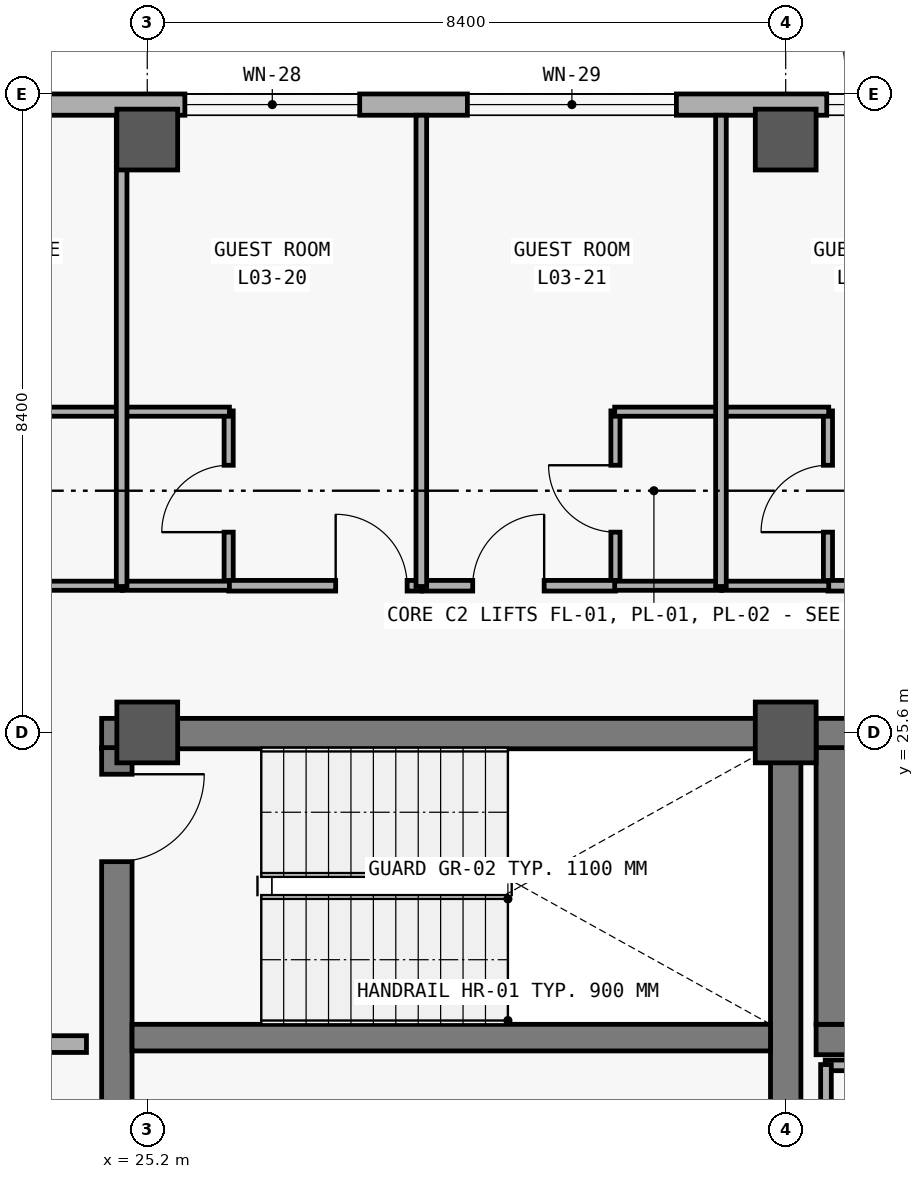
"""IFC4 building model, lengths in metres.
Left out: names, types, materials, properties, quantities, classifications, styles, units other than length and angle.
Written with IfcOpenShell. Run it as: python <this file> out.ifc"""

import sys

from ifc_helpers import new_model, si_unit, direction, frame, frame_2d, origin, origin_2d, place, context, subcontext, project, spatial, rectangle, extrude, element, fill, save


model = new_model("IFC4")
c1 = context("Model", 3, precision=1e-05, world=origin(), true_north=direction((0.0, 1.0)))
c2 = subcontext(c1, "Body", "Model", "MODEL_VIEW")
j1 = project(units=[si_unit("LENGTHUNIT", "METRE"), si_unit("PLANEANGLEUNIT", "RADIAN")], contexts=[c1])
p1 = place(None, origin())
s1 = spatial("IfcSite", under=j1, at=p1, CompositionType="ELEMENT")
p2 = place(p1, origin())
s2 = spatial("IfcBuilding", under=s1, at=p2, CompositionType="ELEMENT")
p3 = place(p2, frame((0.0, 0.0, 15.0)))
s3 = spatial("IfcBuildingStorey", under=s2, at=p3, CompositionType="ELEMENT", Elevation=15.0)
for number, where, z_axis, x_axis in (
    (1, (25.2, 25.6, 0.0), (0.0, 0.0, 1.0), (1.0, 0.0, 0.0)),
    (2, (25.2, 33.4, 0.0), (0.0, 0.0, 1.0), (1.0, 0.0, 0.0)),
    (3, (33.6, 25.6, 0.0), (0.0, 0.0, 1.0), (1.0, 0.0, 0.0)),
    (4, (33.6, 33.4, 0.0), (0.0, 0.0, 1.0), (1.0, 0.0, 0.0)),
):
    element("IfcColumn", number, at=place(p3, frame(where, z_axis=z_axis, x_axis=x_axis)), inside=s3, PredefinedType="COLUMN", context=c2, shape_type="SweptSolid", body=[
        extrude(rectangle(XDim=0.8, YDim=0.8, at=origin_2d()), origin(), (0.0, 0.0, 1.0), 4.2),
    ])
p4 = place(p3, frame((8.68, 33.86, 0.0), z_axis=(0.0, 0.0, 1.0), x_axis=(1.0, 0.0, 0.0)))
e5 = element("IfcWall", 5, at=p4, inside=s3, PredefinedType="SOLIDWALL", context=c2, shape_type="SweptSolid", body=[
    extrude(rectangle(XDim=83.44, YDim=0.28, at=frame_2d((41.72, 0.0))), origin(), (0.0, 0.0, 1.0), 3.92),
])
p5 = place(p4, frame((4.895, 0.0, 0.85)))
e6 = element("IfcOpeningElement", 6, at=p5, cuts=e5, PredefinedType="OPENING", context=c2, shape_type="SweptSolid", body=[
    extrude(rectangle(XDim=2.6, YDim=2.2, at=frame_2d((1.3, 1.1))), frame((0.0, 0.15, 0.0), z_axis=(0.0, -1.0, 0.0), x_axis=(1.0, 0.0, 0.0)), (0.0, 0.0, 1.0), 0.3),
])
p6 = place(p4, frame((13.371, 0.0, 0.85)))
e7 = element("IfcOpeningElement", 7, at=p6, cuts=e5, PredefinedType="OPENING", context=c2, shape_type="SweptSolid", body=[
    extrude(rectangle(XDim=1.7, YDim=2.0, at=frame_2d((0.85, 1.0))), frame((0.0, 0.15, 0.0), z_axis=(0.0, -1.0, 0.0), x_axis=(1.0, 0.0, 0.0)), (0.0, 0.0, 1.0), 0.3),
])
p7 = place(p4, frame((17.015, 0.0, 0.85)))
e8 = element("IfcOpeningElement", 8, at=p7, cuts=e5, PredefinedType="OPENING", context=c2, shape_type="SweptSolid", body=[
    extrude(rectangle(XDim=2.3, YDim=2.05, at=frame_2d((1.15, 1.025))), frame((0.0, 0.15, 0.0), z_axis=(0.0, -1.0, 0.0), x_axis=(1.0, 0.0, 0.0)), (0.0, 0.0, 1.0), 0.3),
])
p8 = place(p4, frame((20.732, 0.0, 0.85)))
e9 = element("IfcOpeningElement", 9, at=p8, cuts=e5, PredefinedType="OPENING", context=c2, shape_type="SweptSolid", body=[
    extrude(rectangle(XDim=2.75, YDim=2.1, at=frame_2d((1.375, 1.05))), frame((0.0, 0.15, 0.0), z_axis=(0.0, -1.0, 0.0), x_axis=(1.0, 0.0, 0.0)), (0.0, 0.0, 1.0), 0.3),
])
p9 = place(p4, frame((25.46, 0.0, 0.85)))
e10 = element("IfcOpeningElement", 10, at=p9, cuts=e5, PredefinedType="OPENING", context=c2, shape_type="SweptSolid", body=[
    extrude(rectangle(XDim=1.18, YDim=1.5, at=frame_2d((0.59, 0.75))), frame((0.0, 0.15, 0.0), z_axis=(0.0, -1.0, 0.0), x_axis=(1.0, 0.0, 0.0)), (0.0, 0.0, 1.0), 0.3),
])
p10 = place(p4, frame((29.352, 0.0, 0.85)))
e11 = element("IfcOpeningElement", 11, at=p10, cuts=e5, PredefinedType="OPENING", context=c2, shape_type="SweptSolid", body=[
    extrude(rectangle(XDim=1.28, YDim=1.6, at=frame_2d((0.64, 0.8))), frame((0.0, 0.15, 0.0), z_axis=(0.0, -1.0, 0.0), x_axis=(1.0, 0.0, 0.0)), (0.0, 0.0, 1.0), 0.3),
])
p11 = place(p4, frame((33.245, 0.0, 0.85)))
e12 = element("IfcOpeningElement", 12, at=p11, cuts=e5, PredefinedType="OPENING", context=c2, shape_type="SweptSolid", body=[
    extrude(rectangle(XDim=1.38, YDim=1.7, at=frame_2d((0.69, 0.85))), frame((0.0, 0.15, 0.0), z_axis=(0.0, -1.0, 0.0), x_axis=(1.0, 0.0, 0.0)), (0.0, 0.0, 1.0), 0.3),
])
p12 = place(p4, frame((37.138, 0.0, 0.85)))
e13 = element("IfcOpeningElement", 13, at=p12, cuts=e5, PredefinedType="OPENING", context=c2, shape_type="SweptSolid", body=[
    extrude(rectangle(XDim=1.48, YDim=1.8, at=frame_2d((0.74, 0.9))), frame((0.0, 0.15, 0.0), z_axis=(0.0, -1.0, 0.0), x_axis=(1.0, 0.0, 0.0)), (0.0, 0.0, 1.0), 0.3),
])
p13 = place(p4, frame((41.031, 0.0, 0.85)))
e14 = element("IfcOpeningElement", 14, at=p13, cuts=e5, PredefinedType="OPENING", context=c2, shape_type="SweptSolid", body=[
    extrude(rectangle(XDim=1.58, YDim=1.85, at=frame_2d((0.79, 0.925))), frame((0.0, 0.15, 0.0), z_axis=(0.0, -1.0, 0.0), x_axis=(1.0, 0.0, 0.0)), (0.0, 0.0, 1.0), 0.3),
])
p14 = place(p4, frame((44.923, 0.0, 0.85)))
e15 = element("IfcOpeningElement", 15, at=p14, cuts=e5, PredefinedType="OPENING", context=c2, shape_type="SweptSolid", body=[
    extrude(rectangle(XDim=1.68, YDim=1.9, at=frame_2d((0.84, 0.95))), frame((0.0, 0.15, 0.0), z_axis=(0.0, -1.0, 0.0), x_axis=(1.0, 0.0, 0.0)), (0.0, 0.0, 1.0), 0.3),
])
p15 = place(p4, frame((48.816, 0.0, 0.85)))
e16 = element("IfcOpeningElement", 16, at=p15, cuts=e5, PredefinedType="OPENING", context=c2, shape_type="SweptSolid", body=[
    extrude(rectangle(XDim=1.78, YDim=1.95, at=frame_2d((0.89, 0.975))), frame((0.0, 0.15, 0.0), z_axis=(0.0, -1.0, 0.0), x_axis=(1.0, 0.0, 0.0)), (0.0, 0.0, 1.0), 0.3),
])
p16 = place(p4, frame((52.71, 0.0, 0.85)))
e17 = element("IfcOpeningElement", 17, at=p16, cuts=e5, PredefinedType="OPENING", context=c2, shape_type="SweptSolid", body=[
    extrude(rectangle(XDim=1.88, YDim=1.95, at=frame_2d((0.94, 0.975))), frame((0.0, 0.15, 0.0), z_axis=(0.0, -1.0, 0.0), x_axis=(1.0, 0.0, 0.0)), (0.0, 0.0, 1.0), 0.3),
])
p17 = place(p4, frame((56.567, 0.0, 0.85)))
e18 = element("IfcOpeningElement", 18, at=p17, cuts=e5, PredefinedType="OPENING", context=c2, shape_type="SweptSolid", body=[
    extrude(rectangle(XDim=2.05, YDim=1.95, at=frame_2d((1.025, 0.975))), frame((0.0, 0.15, 0.0), z_axis=(0.0, -1.0, 0.0), x_axis=(1.0, 0.0, 0.0)), (0.0, 0.0, 1.0), 0.3),
])
p18 = place(p4, frame((60.444, 0.0, 0.85)))
e19 = element("IfcOpeningElement", 19, at=p18, cuts=e5, PredefinedType="OPENING", context=c2, shape_type="SweptSolid", body=[
    extrude(rectangle(XDim=2.18, YDim=1.95, at=frame_2d((1.09, 0.975))), frame((0.0, 0.15, 0.0), z_axis=(0.0, -1.0, 0.0), x_axis=(1.0, 0.0, 0.0)), (0.0, 0.0, 1.0), 0.3),
])
p19 = place(p4, frame((64.287, 0.0, 0.85)))
e20 = element("IfcOpeningElement", 20, at=p19, cuts=e5, PredefinedType="OPENING", context=c2, shape_type="SweptSolid", body=[
    extrude(rectangle(XDim=2.38, YDim=1.95, at=frame_2d((1.19, 0.975))), frame((0.0, 0.15, 0.0), z_axis=(0.0, -1.0, 0.0), x_axis=(1.0, 0.0, 0.0)), (0.0, 0.0, 1.0), 0.3),
])
p20 = place(p4, frame((68.181, 0.0, 0.85)))
e21 = element("IfcOpeningElement", 21, at=p20, cuts=e5, PredefinedType="OPENING", context=c2, shape_type="SweptSolid", body=[
    extrude(rectangle(XDim=2.48, YDim=2.0, at=frame_2d((1.24, 1.0))), frame((0.0, 0.15, 0.0), z_axis=(0.0, -1.0, 0.0), x_axis=(1.0, 0.0, 0.0)), (0.0, 0.0, 1.0), 0.3),
])
p21 = place(p4, frame((72.038, 0.0, 0.85)))
e22 = element("IfcOpeningElement", 22, at=p21, cuts=e5, PredefinedType="OPENING", context=c2, shape_type="SweptSolid", body=[
    extrude(rectangle(XDim=2.65, YDim=2.0, at=frame_2d((1.325, 1.0))), frame((0.0, 0.15, 0.0), z_axis=(0.0, -1.0, 0.0), x_axis=(1.0, 0.0, 0.0)), (0.0, 0.0, 1.0), 0.3),
])
p22 = place(p4, frame((75.831, 0.0, 0.85)))
e23 = element("IfcOpeningElement", 23, at=p22, cuts=e5, PredefinedType="OPENING", context=c2, shape_type="SweptSolid", body=[
    extrude(rectangle(XDim=2.95, YDim=2.05, at=frame_2d((1.475, 1.025))), frame((0.0, 0.15, 0.0), z_axis=(0.0, -1.0, 0.0), x_axis=(1.0, 0.0, 0.0)), (0.0, 0.0, 1.0), 0.3),
])
p23 = place(p4, frame((80.349, 0.0, 0.85)))
e24 = element("IfcOpeningElement", 24, at=p23, cuts=e5, PredefinedType="OPENING", context=c2, shape_type="SweptSolid", body=[
    extrude(rectangle(XDim=1.8, YDim=1.8, at=frame_2d((0.9, 0.9))), frame((0.0, 0.15, 0.0), z_axis=(0.0, -1.0, 0.0), x_axis=(1.0, 0.0, 0.0)), (0.0, 0.0, 1.0), 0.3),
])
p24 = place(p3, frame((33.8, 25.585, 0.0), z_axis=(0.0, 0.0, 1.0), x_axis=(-1.0, 0.0, 0.0)))
e25 = element("IfcWall", 25, at=p24, inside=s3, PredefinedType="SHEAR", context=c2, shape_type="SweptSolid", body=[
    extrude(rectangle(XDim=9.2, YDim=0.4, at=frame_2d((4.6, 0.0))), origin(), (0.0, 0.0, 1.0), 3.92),
])
p25 = place(p3, frame((24.8, 25.4, 0.0), z_axis=(0.0, 0.0, 1.0), x_axis=(0.0, -1.0, 0.0)))
e26 = element("IfcWall", 26, at=p25, inside=s3, PredefinedType="SHEAR", context=c2, shape_type="SweptSolid", body=[
    extrude(rectangle(XDim=7.4, YDim=0.4, at=frame_2d((3.7, 0.0))), origin(), (0.0, 0.0, 1.0), 3.92),
])
p26 = place(p25, frame((0.35, 0.0, 0.0)))
e27 = element("IfcOpeningElement", 27, at=p26, cuts=e26, PredefinedType="OPENING", context=c2, shape_type="SweptSolid", body=[
    extrude(rectangle(XDim=1.15, YDim=2.2, at=frame_2d((0.575, 1.1))), frame((0.0, 0.21, 0.0), z_axis=(0.0, -1.0, 0.0), x_axis=(1.0, 0.0, 0.0)), (0.0, 0.0, 1.0), 0.42),
])
p27 = place(p3, frame((33.6, 18.0, 0.0), z_axis=(0.0, 0.0, 1.0), x_axis=(0.0, 1.0, 0.0)))
e28 = element("IfcWall", 28, at=p27, inside=s3, PredefinedType="SHEAR", context=c2, shape_type="SweptSolid", body=[
    extrude(rectangle(XDim=7.4, YDim=0.4, at=frame_2d((3.7, 0.0))), origin(), (0.0, 0.0, 1.0), 3.92),
])
p28 = place(p3, frame((25.0, 21.585, 0.0), z_axis=(0.0, 0.0, 1.0), x_axis=(1.0, 0.0, 0.0)))
e29 = element("IfcWall", 29, at=p28, inside=s3, PredefinedType="SHEAR", context=c2, shape_type="SweptSolid", body=[
    extrude(rectangle(XDim=8.4, YDim=0.35, at=frame_2d((4.2, 0.0))), origin(), (0.0, 0.0, 1.0), 3.92),
])
p29 = place(p3, frame((19.6, 21.5, 0.0), z_axis=(0.0, 0.0, 1.0), x_axis=(1.0, 0.0, 0.0)))
e30 = element("IfcWall", 30, at=p29, inside=s3, PredefinedType="SOLIDWALL", context=c2, shape_type="SweptSolid", body=[
    extrude(rectangle(XDim=4.8, YDim=0.22, at=frame_2d((2.4, 0.0))), origin(), (0.0, 0.0, 1.0), 3.07),
])
p30 = place(p29, frame((2.05, 0.0, 0.0)))
e31 = element("IfcOpeningElement", 31, at=p30, cuts=e30, PredefinedType="OPENING", context=c2, shape_type="SweptSolid", body=[
    extrude(rectangle(XDim=1.25, YDim=2.2, at=frame_2d((0.625, 1.1))), frame((0.0, 0.12, 0.0), z_axis=(0.0, -1.0, 0.0), x_axis=(1.0, 0.0, 0.0)), (0.0, 0.0, 1.0), 0.24),
])
for number, where, z_axis, x_axis in (
    (32, (34.0, 21.56, 0.0), (0.0, 0.0, 1.0), (1.0, 0.0, 0.0)),
    (33, (43.1, 25.585, 0.0), (0.0, 0.0, 1.0), (-1.0, 0.0, 0.0)),
):
    element("IfcWall", number, at=place(p3, frame(where, z_axis=z_axis, x_axis=x_axis)), inside=s3, PredefinedType="SHEAR", context=c2, shape_type="SweptSolid", body=[
        extrude(rectangle(XDim=9.1, YDim=0.4, at=frame_2d((4.55, 0.0))), origin(), (0.0, 0.0, 1.0), 3.92),
    ])
p31 = place(p3, frame((34.2, 25.4, 0.0), z_axis=(0.0, 0.0, 1.0), x_axis=(0.0, -1.0, 0.0)))
e34 = element("IfcWall", 34, at=p31, inside=s3, PredefinedType="SHEAR", context=c2, shape_type="SweptSolid", body=[
    extrude(rectangle(XDim=3.64, YDim=0.4, at=frame_2d((1.82, 0.0))), origin(), (0.0, 0.0, 1.0), 3.92),
])
p32 = place(p3, frame((26.271, 27.52, 0.0), z_axis=(0.0, 0.0, 1.0), x_axis=(0.0, 1.0, 0.0)))
e35 = element("IfcWall", 35, at=p32, inside=s3, PredefinedType="PARTITIONING", context=c2, shape_type="SweptSolid", body=[
    extrude(rectangle(XDim=2.31, YDim=0.12, at=frame_2d((1.155, 0.0))), origin(), (0.0, 0.0, 1.0), 3.02),
])
p33 = place(p32, frame((0.715, 0.0, 0.0)))
e36 = element("IfcOpeningElement", 36, at=p33, cuts=e35, PredefinedType="OPENING", context=c2, shape_type="SweptSolid", body=[
    extrude(rectangle(XDim=0.88, YDim=2.15, at=frame_2d((0.44, 1.075))), frame((0.0, 0.07, 0.0), z_axis=(0.0, -1.0, 0.0), x_axis=(1.0, 0.0, 0.0)), (0.0, 0.0, 1.0), 0.14),
])
p34 = place(p3, frame((31.36, 27.52, 0.0), z_axis=(0.0, 0.0, 1.0), x_axis=(0.0, 1.0, 0.0)))
e37 = element("IfcWall", 37, at=p34, inside=s3, PredefinedType="PARTITIONING", context=c2, shape_type="SweptSolid", body=[
    extrude(rectangle(XDim=2.31, YDim=0.12, at=frame_2d((1.155, 0.0))), origin(), (0.0, 0.0, 1.0), 3.02),
])
p35 = place(p34, frame((0.715, 0.0, 0.0)))
e38 = element("IfcOpeningElement", 38, at=p35, cuts=e37, PredefinedType="OPENING", context=c2, shape_type="SweptSolid", body=[
    extrude(rectangle(XDim=0.88, YDim=2.15, at=frame_2d((0.44, 1.075))), frame((0.0, 0.07, 0.0), z_axis=(0.0, -1.0, 0.0), x_axis=(1.0, 0.0, 0.0)), (0.0, 0.0, 1.0), 0.14),
])
p36 = place(p3, frame((34.156, 27.52, 0.0), z_axis=(0.0, 0.0, 1.0), x_axis=(0.0, 1.0, 0.0)))
e39 = element("IfcWall", 39, at=p36, inside=s3, PredefinedType="PARTITIONING", context=c2, shape_type="SweptSolid", body=[
    extrude(rectangle(XDim=2.31, YDim=0.12, at=frame_2d((1.155, 0.0))), origin(), (0.0, 0.0, 1.0), 3.02),
])
p37 = place(p36, frame((0.715, 0.0, 0.0)))
e40 = element("IfcOpeningElement", 40, at=p37, cuts=e39, PredefinedType="OPENING", context=c2, shape_type="SweptSolid", body=[
    extrude(rectangle(XDim=0.88, YDim=2.15, at=frame_2d((0.44, 1.075))), frame((0.0, 0.07, 0.0), z_axis=(0.0, -1.0, 0.0), x_axis=(1.0, 0.0, 0.0)), (0.0, 0.0, 1.0), 0.14),
])
p38 = place(p3, frame((26.271, 27.53, 0.0), z_axis=(0.0, 0.0, 1.0), x_axis=(1.0, 0.0, 0.0)))
e41 = element("IfcWall", 41, at=p38, inside=s3, PredefinedType="PARTITIONING", context=c2, shape_type="SweptSolid", body=[
    extrude(rectangle(XDim=2.535, YDim=0.14, at=frame_2d((1.268, 0.0))), origin(), (0.0, 0.0, 1.0), 3.02),
])
p39 = place(p38, frame((1.408, 0.0, 0.0)))
e42 = element("IfcOpeningElement", 42, at=p39, cuts=e41, PredefinedType="OPENING", context=c2, shape_type="SweptSolid", body=[
    extrude(rectangle(XDim=0.94, YDim=2.2, at=frame_2d((0.47, 1.1))), frame((0.0, 0.08, 0.0), z_axis=(0.0, -1.0, 0.0), x_axis=(1.0, 0.0, 0.0)), (0.0, 0.0, 1.0), 0.16),
])
p40 = place(p3, frame((28.826, 27.53, 0.0), z_axis=(0.0, 0.0, 1.0), x_axis=(1.0, 0.0, 0.0)))
e43 = element("IfcWall", 43, at=p40, inside=s3, PredefinedType="PARTITIONING", context=c2, shape_type="SweptSolid", body=[
    extrude(rectangle(XDim=2.534, YDim=0.14, at=frame_2d((1.267, 0.0))), origin(), (0.0, 0.0, 1.0), 3.02),
])
p41 = place(p40, frame((0.656, 0.0, 0.0)))
e44 = element("IfcOpeningElement", 44, at=p41, cuts=e43, PredefinedType="OPENING", context=c2, shape_type="SweptSolid", body=[
    extrude(rectangle(XDim=0.94, YDim=2.2, at=frame_2d((0.47, 1.1))), frame((0.0, 0.08, 0.0), z_axis=(0.0, -1.0, 0.0), x_axis=(1.0, 0.0, 0.0)), (0.0, 0.0, 1.0), 0.16),
])
p42 = place(p3, frame((34.156, 27.53, 0.0), z_axis=(0.0, 0.0, 1.0), x_axis=(1.0, 0.0, 0.0)))
e45 = element("IfcWall", 45, at=p42, inside=s3, PredefinedType="PARTITIONING", context=c2, shape_type="SweptSolid", body=[
    extrude(rectangle(XDim=2.535, YDim=0.14, at=frame_2d((1.268, 0.0))), origin(), (0.0, 0.0, 1.0), 3.02),
])
p43 = place(p42, frame((1.408, 0.0, 0.0)))
e46 = element("IfcOpeningElement", 46, at=p43, cuts=e45, PredefinedType="OPENING", context=c2, shape_type="SweptSolid", body=[
    extrude(rectangle(XDim=0.94, YDim=2.2, at=frame_2d((0.47, 1.1))), frame((0.0, 0.08, 0.0), z_axis=(0.0, -1.0, 0.0), x_axis=(1.0, 0.0, 0.0)), (0.0, 0.0, 1.0), 0.16),
])
for number, where, z_axis, x_axis in (
    (47, (23.465, 27.53, 0.0), (0.0, 0.0, 1.0), (1.0, 0.0, 0.0)),
    (48, (23.465, 29.82, 0.0), (0.0, 0.0, 1.0), (1.0, 0.0, 0.0)),
    (49, (24.873, 27.53, 0.0), (0.0, 0.0, 1.0), (1.0, 0.0, 0.0)),
    (50, (24.873, 29.82, 0.0), (0.0, 0.0, 1.0), (1.0, 0.0, 0.0)),
    (51, (31.35, 27.53, 0.0), (0.0, 0.0, 1.0), (1.0, 0.0, 0.0)),
    (52, (31.35, 29.82, 0.0), (0.0, 0.0, 1.0), (1.0, 0.0, 0.0)),
    (53, (32.758, 27.53, 0.0), (0.0, 0.0, 1.0), (1.0, 0.0, 0.0)),
    (54, (32.758, 29.82, 0.0), (0.0, 0.0, 1.0), (1.0, 0.0, 0.0)),
):
    element("IfcWall", number, at=place(p3, frame(where, z_axis=z_axis, x_axis=x_axis)), inside=s3, PredefinedType="PARTITIONING", context=c2, shape_type="SweptSolid", body=[
        extrude(rectangle(XDim=1.408, YDim=0.12, at=frame_2d((0.704, 0.0))), origin(), (0.0, 0.0, 1.0), 3.02),
    ])
p44 = place(p3, frame((34.12, 21.22, 0.0), z_axis=(0.0, 0.0, 1.0), x_axis=(1.0, 0.0, 0.0)))
e55 = element("IfcWall", 55, at=p44, inside=s3, PredefinedType="PARTITIONING", context=c2, shape_type="SweptSolid", body=[
    extrude(rectangle(XDim=10.76, YDim=0.14, at=frame_2d((5.38, 0.0))), origin(), (0.0, 0.0, 1.0), 3.02),
])
p45 = place(p3, frame((34.13, 17.77, 0.0), z_axis=(0.0, 0.0, 1.0), x_axis=(0.0, 1.0, 0.0)))
e56 = element("IfcWall", 56, at=p45, inside=s3, PredefinedType="PARTITIONING", context=c2, shape_type="SweptSolid", body=[
    extrude(rectangle(XDim=3.46, YDim=0.14, at=frame_2d((1.73, 0.0))), origin(), (0.0, 0.0, 1.0), 3.02),
])
for number, where, z_axis, x_axis in (
    (57, (24.863, 27.52, 0.0), (0.0, 0.0, 1.0), (0.0, 1.0, 0.0)),
    (58, (28.806, 27.52, 0.0), (0.0, 0.0, 1.0), (0.0, 1.0, 0.0)),
    (59, (32.748, 27.52, 0.0), (0.0, 0.0, 1.0), (0.0, 1.0, 0.0)),
):
    element("IfcWall", number, at=place(p3, frame(where, z_axis=z_axis, x_axis=x_axis)), inside=s3, PredefinedType="PARTITIONING", context=c2, shape_type="SweptSolid", body=[
        extrude(rectangle(XDim=6.2, YDim=0.14, at=frame_2d((3.1, 0.0))), origin(), (0.0, 0.0, 1.0), 3.02),
    ])
p46 = place(p7, origin())
e60 = element("IfcWindow", 60, at=p46, inside=s3, PartitioningType="SINGLE_PANEL", PredefinedType="WINDOW", context=c2, shape_type="SweptSolid", body=[
    extrude(rectangle(XDim=2.3, YDim=2.05, at=frame_2d((1.15, 1.025))), frame((0.0, 0.03, 0.0), z_axis=(0.0, -1.0, 0.0), x_axis=(1.0, 0.0, 0.0)), (0.0, 0.0, 1.0), 0.06),
])
fill(e8, e60)
p47 = place(p8, origin())
e61 = element("IfcWindow", 61, at=p47, inside=s3, PartitioningType="SINGLE_PANEL", PredefinedType="WINDOW", context=c2, shape_type="SweptSolid", body=[
    extrude(rectangle(XDim=2.75, YDim=2.1, at=frame_2d((1.375, 1.05))), frame((0.0, 0.03, 0.0), z_axis=(0.0, -1.0, 0.0), x_axis=(1.0, 0.0, 0.0)), (0.0, 0.0, 1.0), 0.06),
])
fill(e9, e61)
p48 = place(p9, origin())
e62 = element("IfcWindow", 62, at=p48, inside=s3, PartitioningType="SINGLE_PANEL", PredefinedType="WINDOW", context=c2, shape_type="SweptSolid", body=[
    extrude(rectangle(XDim=1.18, YDim=1.5, at=frame_2d((0.59, 0.75))), frame((0.0, 0.03, 0.0), z_axis=(0.0, -1.0, 0.0), x_axis=(1.0, 0.0, 0.0)), (0.0, 0.0, 1.0), 0.06),
])
fill(e10, e62)
p49 = place(p26, origin())
e63 = element("IfcDoor", 63, at=p49, inside=s3, OperationType="SINGLE_SWING_LEFT", PredefinedType="DOOR", context=c2, shape_type="SweptSolid", body=[
    extrude(rectangle(XDim=1.15, YDim=2.2, at=frame_2d((0.575, 1.1))), frame((0.0, 0.025, 0.0), z_axis=(0.0, -1.0, 0.0), x_axis=(1.0, 0.0, 0.0)), (0.0, 0.0, 1.0), 0.05),
])
fill(e27, e63)
p50 = place(p33, origin())
e64 = element("IfcDoor", 64, at=p50, inside=s3, OperationType="SINGLE_SWING_LEFT", PredefinedType="DOOR", context=c2, shape_type="SweptSolid", body=[
    extrude(rectangle(XDim=0.88, YDim=2.15, at=frame_2d((0.44, 1.075))), frame((0.0, 0.025, 0.0), z_axis=(0.0, -1.0, 0.0), x_axis=(1.0, 0.0, 0.0)), (0.0, 0.0, 1.0), 0.05),
])
fill(e36, e64)
p51 = place(p35, origin())
e65 = element("IfcDoor", 65, at=p51, inside=s3, OperationType="SINGLE_SWING_RIGHT", PredefinedType="DOOR", context=c2, shape_type="SweptSolid", body=[
    extrude(rectangle(XDim=0.88, YDim=2.15, at=frame_2d((0.44, 1.075))), frame((0.0, 0.025, 0.0), z_axis=(0.0, -1.0, 0.0), x_axis=(1.0, 0.0, 0.0)), (0.0, 0.0, 1.0), 0.05),
])
fill(e38, e65)
p52 = place(p37, origin())
e66 = element("IfcDoor", 66, at=p52, inside=s3, OperationType="SINGLE_SWING_LEFT", PredefinedType="DOOR", context=c2, shape_type="SweptSolid", body=[
    extrude(rectangle(XDim=0.88, YDim=2.15, at=frame_2d((0.44, 1.075))), frame((0.0, 0.025, 0.0), z_axis=(0.0, -1.0, 0.0), x_axis=(1.0, 0.0, 0.0)), (0.0, 0.0, 1.0), 0.05),
])
fill(e40, e66)
p53 = place(p39, origin())
e67 = element("IfcDoor", 67, at=p53, inside=s3, OperationType="SINGLE_SWING_LEFT", PredefinedType="DOOR", context=c2, shape_type="SweptSolid", body=[
    extrude(rectangle(XDim=0.94, YDim=2.2, at=frame_2d((0.47, 1.1))), frame((0.0, 0.025, 0.0), z_axis=(0.0, -1.0, 0.0), x_axis=(1.0, 0.0, 0.0)), (0.0, 0.0, 1.0), 0.05),
])
fill(e42, e67)
p54 = place(p41, origin())
e68 = element("IfcDoor", 68, at=p54, inside=s3, OperationType="SINGLE_SWING_RIGHT", PredefinedType="DOOR", context=c2, shape_type="SweptSolid", body=[
    extrude(rectangle(XDim=0.94, YDim=2.2, at=frame_2d((0.47, 1.1))), frame((0.0, 0.025, 0.0), z_axis=(0.0, -1.0, 0.0), x_axis=(1.0, 0.0, 0.0)), (0.0, 0.0, 1.0), 0.05),
])
fill(e44, e68)
save(model, sys.argv[1])
